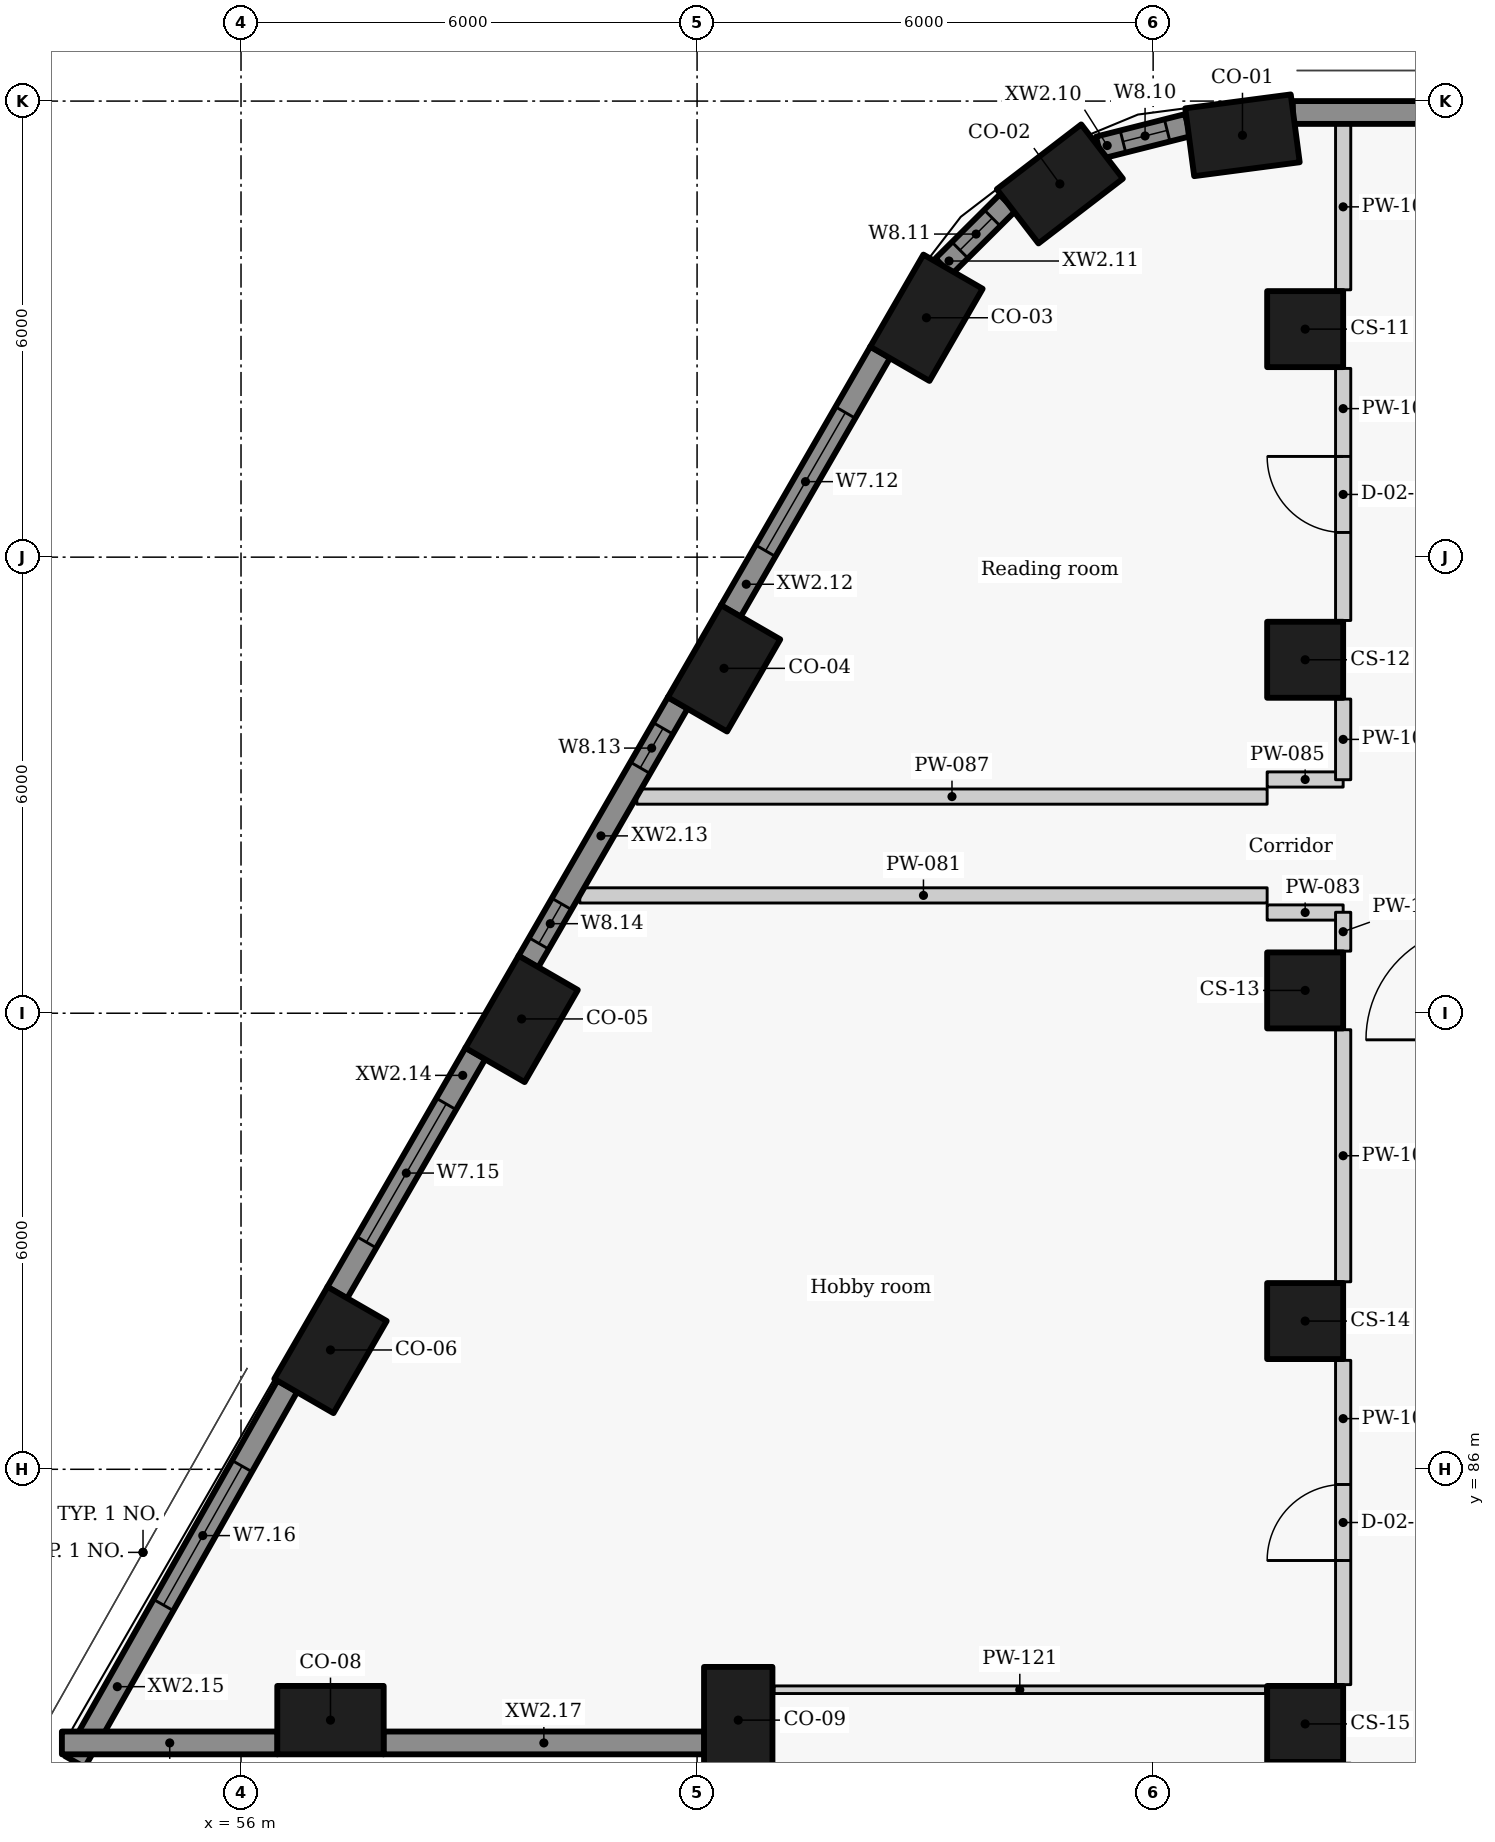
"""IFC4 building model, lengths in metres.
Left out: names, types, materials, properties, quantities, classifications, styles, units other than length and angle.
Written with IfcOpenShell. Run it as: python <this file> out.ifc"""

import sys

from ifc_helpers import new_model, si_unit, direction, frame, frame_2d, origin, origin_2d, place, context, subcontext, project, spatial, rectangle, extrude, element, fill, save


model = new_model("IFC4")
c1 = context("Model", 3, precision=1e-05, world=origin(), true_north=direction((0.0, 1.0)))
c2 = subcontext(c1, "Body", "Model", "MODEL_VIEW")
j1 = project(units=[si_unit("LENGTHUNIT", "METRE"), si_unit("PLANEANGLEUNIT", "RADIAN")], contexts=[c1])
p1 = place(None, origin())
s1 = spatial("IfcSite", under=j1, at=p1, CompositionType="ELEMENT")
p2 = place(p1, origin())
s2 = spatial("IfcBuilding", under=s1, at=p2, CompositionType="ELEMENT")
p3 = place(p2, frame((0.0, 0.0, 81.0)))
s3 = spatial("IfcBuildingStorey", under=s2, at=p3, CompositionType="ELEMENT", Elevation=81.0)
for number, where, z_axis, x_axis in (
    (1, (69.175, 103.55, 0.0), (0.0, 0.0, 1.0), (-0.991, -0.131, 0.0)),
    (2, (66.773, 102.91, 0.0), (0.0, 0.0, 1.0), (-0.793, -0.609, 0.0)),
    (3, (65.018, 101.149, 0.0), (0.0, 0.0, 1.0), (-0.5, -0.866, 0.0)),
    (4, (62.354, 96.537, 0.0), (0.0, 0.0, 1.0), (-0.5, -0.866, 0.0)),
    (5, (59.692, 91.925, 0.0), (0.0, 0.0, 1.0), (-0.5, -0.866, 0.0)),
    (6, (57.177, 87.57, 0.0), (0.0, 0.0, 1.0), (-0.5, -0.866, 0.0)),
    (7, (57.177, 82.7, 0.0), (0.0, 0.0, 1.0), (1.0, 0.0, 0.0)),
    (8, (62.542, 82.7, 0.0), (0.0, 0.0, 1.0), (0.0, -1.0, 0.0)),
):
    element("IfcColumn", number, at=place(p3, frame(where, z_axis=z_axis, x_axis=x_axis)), inside=s3, PredefinedType="COLUMN", context=c2, shape_type="SweptSolid", body=[
        extrude(rectangle(XDim=1.4, YDim=0.9, at=origin_2d()), origin(), (0.0, 0.0, 1.0), 3.3),
    ])
for number, where, z_axis, x_axis in (
    (9, (70.0, 101.0, 0.0), (0.0, 0.0, 1.0), (0.0, -1.0, 0.0)),
    (10, (70.0, 96.65, 0.0), (0.0, 0.0, 1.0), (0.0, -1.0, 0.0)),
    (11, (70.0, 92.3, 0.0), (0.0, 0.0, 1.0), (0.0, -1.0, 0.0)),
    (12, (70.0, 87.95, 0.0), (0.0, 0.0, 1.0), (0.0, -1.0, 0.0)),
    (13, (70.0, 82.65, 0.0), (0.0, 0.0, 1.0), (0.0, -1.0, 0.0)),
):
    element("IfcColumn", number, at=place(p3, frame(where, z_axis=z_axis, x_axis=x_axis)), inside=s3, PredefinedType="COLUMN", context=c2, shape_type="SweptSolid", body=[
        extrude(rectangle(XDim=1.0, YDim=1.0, at=origin_2d()), origin(), (0.0, 0.0, 1.0), 3.3),
    ])
p4 = place(p3, frame((90.129, 103.85, 0.0), z_axis=(0.0, 0.0, 1.0), x_axis=(-1.0, 0.0, 0.0)))
e14 = element("IfcWall", 14, at=p4, inside=s3, PredefinedType="SOLIDWALL", context=c2, shape_type="SweptSolid", body=[
    extrude(rectangle(XDim=20.291, YDim=0.3, at=frame_2d((10.146, 0.0))), origin(), (0.0, 0.0, 1.0), 2.425),
])
p5 = place(p3, frame((68.456, 103.683, 0.0), z_axis=(0.0, 0.0, 1.0), x_axis=(-0.969485113966, -0.245150186208, 0.0)))
e15 = element("IfcWall", 15, at=p5, inside=s3, PredefinedType="SOLIDWALL", context=c2, shape_type="SweptSolid", body=[
    extrude(rectangle(XDim=1.208, YDim=0.3, at=frame_2d((0.604, 0.0))), origin(), (0.0, 0.0, 1.0), 2.425),
])
p6 = place(p5, frame((0.28, 0.0, 0.9)))
e16 = element("IfcOpeningElement", 16, at=p6, cuts=e15, PredefinedType="OPENING", context=c2, shape_type="SweptSolid", body=[
    extrude(rectangle(XDim=0.6, YDim=1.1, at=frame_2d((0.3, 0.55))), frame((0.0, 0.16, 0.0), z_axis=(0.0, -1.0, 0.0), x_axis=(1.0, 0.0, 0.0)), (0.0, 0.0, 1.0), 0.32),
])
p7 = place(p3, frame((66.085, 102.663, 0.0), z_axis=(0.0, 0.0, 1.0), x_axis=(-0.708951665509, -0.705257070842, 0.0)))
e17 = element("IfcWall", 17, at=p7, inside=s3, PredefinedType="SOLIDWALL", context=c2, shape_type="SweptSolid", body=[
    extrude(rectangle(XDim=1.189, YDim=0.3, at=frame_2d((0.595, 0.0))), origin(), (0.0, 0.0, 1.0), 2.425),
])
p8 = place(p7, frame((0.284, 0.0, 0.9)))
e18 = element("IfcOpeningElement", 18, at=p8, cuts=e17, PredefinedType="OPENING", context=c2, shape_type="SweptSolid", body=[
    extrude(rectangle(XDim=0.6, YDim=1.1, at=frame_2d((0.3, 0.55))), frame((0.0, 0.16, 0.0), z_axis=(0.0, -1.0, 0.0), x_axis=(1.0, 0.0, 0.0)), (0.0, 0.0, 1.0), 0.32),
])
p9 = place(p3, frame((64.41, 100.697, 0.0), z_axis=(0.0, 0.0, 1.0), x_axis=(-0.500003583557, -0.866023334807, 0.0)))
e19 = element("IfcWall", 19, at=p9, inside=s3, PredefinedType="SOLIDWALL", context=c2, shape_type="SweptSolid", body=[
    extrude(rectangle(XDim=3.934, YDim=0.3, at=frame_2d((1.967, 0.0))), origin(), (0.0, 0.0, 1.0), 2.425),
])
p10 = place(p9, frame((0.917, 0.0, 0.9)))
e20 = element("IfcOpeningElement", 20, at=p10, cuts=e19, PredefinedType="OPENING", context=c2, shape_type="SweptSolid", body=[
    extrude(rectangle(XDim=2.1, YDim=1.1, at=frame_2d((1.05, 0.55))), frame((0.0, 0.16, 0.0), z_axis=(0.0, -1.0, 0.0), x_axis=(1.0, 0.0, 0.0)), (0.0, 0.0, 1.0), 0.32),
])
p11 = place(p3, frame((61.747, 96.084, 0.0), z_axis=(0.0, 0.0, 1.0), x_axis=(-0.499957037901, -0.866050206543, 0.0)))
e21 = element("IfcWall", 21, at=p11, inside=s3, PredefinedType="SOLIDWALL", context=c2, shape_type="SweptSolid", body=[
    extrude(rectangle(XDim=3.934, YDim=0.3, at=frame_2d((1.967, 0.0))), origin(), (0.0, 0.0, 1.0), 2.425),
])
p12 = place(p11, frame((0.389, 0.0, 0.9)))
e22 = element("IfcOpeningElement", 22, at=p12, cuts=e21, PredefinedType="OPENING", context=c2, shape_type="SweptSolid", body=[
    extrude(rectangle(XDim=0.6, YDim=1.1, at=frame_2d((0.3, 0.55))), frame((0.0, 0.16, 0.0), z_axis=(0.0, -1.0, 0.0), x_axis=(1.0, 0.0, 0.0)), (0.0, 0.0, 1.0), 0.32),
])
p13 = place(p11, frame((3.056, 0.0, 0.9)))
e23 = element("IfcOpeningElement", 23, at=p13, cuts=e21, PredefinedType="OPENING", context=c2, shape_type="SweptSolid", body=[
    extrude(rectangle(XDim=0.6, YDim=1.1, at=frame_2d((0.3, 0.55))), frame((0.0, 0.16, 0.0), z_axis=(0.0, -1.0, 0.0), x_axis=(1.0, 0.0, 0.0)), (0.0, 0.0, 1.0), 0.32),
])
p14 = place(p3, frame((59.084, 91.472, 0.0), z_axis=(0.0, 0.0, 1.0), x_axis=(-0.500009139881, -0.866020126807, 0.0)))
e24 = element("IfcWall", 24, at=p14, inside=s3, PredefinedType="SOLIDWALL", context=c2, shape_type="SweptSolid", body=[
    extrude(rectangle(XDim=3.637, YDim=0.3, at=frame_2d((1.818, 0.0))), origin(), (0.0, 0.0, 1.0), 2.425),
])
p15 = place(p14, frame((0.768, 0.0, 0.9)))
e25 = element("IfcOpeningElement", 25, at=p15, cuts=e24, PredefinedType="OPENING", context=c2, shape_type="SweptSolid", body=[
    extrude(rectangle(XDim=2.1, YDim=1.1, at=frame_2d((1.05, 0.55))), frame((0.0, 0.16, 0.0), z_axis=(0.0, -1.0, 0.0), x_axis=(1.0, 0.0, 0.0)), (0.0, 0.0, 1.0), 0.32),
])
p16 = place(p3, frame((56.609, 87.094, 0.0), z_axis=(0.0, 0.0, 1.0), x_axis=(-0.492456858874, -0.870336855561, 0.0)))
e26 = element("IfcWall", 26, at=p16, inside=s3, PredefinedType="SOLIDWALL", context=c2, shape_type="SweptSolid", body=[
    extrude(rectangle(XDim=5.677, YDim=0.3, at=frame_2d((2.838, 0.0))), origin(), (0.0, 0.0, 1.0), 2.425),
])
p17 = place(p16, frame((1.209, 0.0, 0.9)))
e27 = element("IfcOpeningElement", 27, at=p17, cuts=e26, PredefinedType="OPENING", context=c2, shape_type="SweptSolid", body=[
    extrude(rectangle(XDim=2.1, YDim=1.1, at=frame_2d((1.05, 0.55))), frame((0.0, 0.16, 0.0), z_axis=(0.0, -1.0, 0.0), x_axis=(1.0, 0.0, 0.0)), (0.0, 0.0, 1.0), 0.32),
])
p18 = place(p3, frame((53.643, 82.4, 0.0), z_axis=(0.0, 0.0, 1.0), x_axis=(1.0, 0.0, 0.0)))
e28 = element("IfcWall", 28, at=p18, inside=s3, PredefinedType="SOLIDWALL", context=c2, shape_type="SweptSolid", body=[
    extrude(rectangle(XDim=2.838, YDim=0.3, at=frame_2d((1.419, 0.0))), origin(), (0.0, 0.0, 1.0), 2.425),
])
p19 = place(p3, frame((57.873, 82.4, 0.0), z_axis=(0.0, 0.0, 1.0), x_axis=(1.0, 0.0, 0.0)))
e29 = element("IfcWall", 29, at=p19, inside=s3, PredefinedType="SOLIDWALL", context=c2, shape_type="SweptSolid", body=[
    extrude(rectangle(XDim=4.223, YDim=0.3, at=frame_2d((2.111, 0.0))), origin(), (0.0, 0.0, 1.0), 2.425),
])
p20 = place(p3, frame((60.457, 93.55, 0.0), z_axis=(0.0, 0.0, 1.0), x_axis=(1.0, 0.0, 0.0)))
e30 = element("IfcWall", 30, at=p20, inside=s3, PredefinedType="PARTITIONING", context=c2, shape_type="SweptSolid", body=[
    extrude(rectangle(XDim=9.043, YDim=0.2, at=frame_2d((4.521, 0.0))), origin(), (0.0, 0.0, 1.0), 2.405),
])
for number, where, z_axis, x_axis in (
    (31, (69.5, 93.325, 0.0), (0.0, 0.0, 1.0), (1.0, 0.0, 0.0)),
    (32, (69.5, 95.075, 0.0), (0.0, 0.0, 1.0), (1.0, 0.0, 0.0)),
):
    element("IfcWall", number, at=place(p3, frame(where, z_axis=z_axis, x_axis=x_axis)), inside=s3, PredefinedType="PARTITIONING", context=c2, shape_type="SweptSolid", body=[
        extrude(rectangle(XDim=1.0, YDim=0.2, at=frame_2d((0.5, 0.0))), origin(), (0.0, 0.0, 1.0), 2.505),
    ])
p21 = place(p3, frame((61.207, 94.85, 0.0), z_axis=(0.0, 0.0, 1.0), x_axis=(1.0, 0.0, 0.0)))
e33 = element("IfcWall", 33, at=p21, inside=s3, PredefinedType="PARTITIONING", context=c2, shape_type="SweptSolid", body=[
    extrude(rectangle(XDim=8.293, YDim=0.2, at=frame_2d((4.146, 0.0))), origin(), (0.0, 0.0, 1.0), 2.405),
])
p22 = place(p3, frame((70.5, 83.167, 0.0), z_axis=(0.0, 0.0, 1.0), x_axis=(0.0, 1.0, 0.0)))
e34 = element("IfcWall", 34, at=p22, inside=s3, PredefinedType="PARTITIONING", context=c2, shape_type="SweptSolid", body=[
    extrude(rectangle(XDim=4.266, YDim=0.2, at=frame_2d((2.133, 0.0))), origin(), (0.0, 0.0, 1.0), 3.025),
])
p23 = place(p22, frame((1.633, 0.0, 0.0)))
e35 = element("IfcOpeningElement", 35, at=p23, cuts=e34, PredefinedType="OPENING", context=c2, shape_type="SweptSolid", body=[
    extrude(rectangle(XDim=1.0, YDim=2.1, at=frame_2d((0.5, 1.05))), frame((0.0, 0.11, 0.0), z_axis=(0.0, -1.0, 0.0), x_axis=(1.0, 0.0, 0.0)), (0.0, 0.0, 1.0), 0.22),
])
p24 = place(p3, frame((70.5, 88.467, 0.0), z_axis=(0.0, 0.0, 1.0), x_axis=(0.0, 1.0, 0.0)))
e36 = element("IfcWall", 36, at=p24, inside=s3, PredefinedType="PARTITIONING", context=c2, shape_type="SweptSolid", body=[
    extrude(rectangle(XDim=3.316, YDim=0.2, at=frame_2d((1.658, 0.0))), origin(), (0.0, 0.0, 1.0), 3.025),
])
p25 = place(p3, frame((70.5, 92.817, 0.0), z_axis=(0.0, 0.0, 1.0), x_axis=(0.0, 1.0, 0.0)))
e37 = element("IfcWall", 37, at=p25, inside=s3, PredefinedType="PARTITIONING", context=c2, shape_type="SweptSolid", body=[
    extrude(rectangle(XDim=0.511, YDim=0.2, at=frame_2d((0.255, 0.0))), origin(), (0.0, 0.0, 1.0), 3.025),
])
p26 = place(p3, frame((70.5, 95.072, 0.0), z_axis=(0.0, 0.0, 1.0), x_axis=(0.0, 1.0, 0.0)))
e38 = element("IfcWall", 38, at=p26, inside=s3, PredefinedType="PARTITIONING", context=c2, shape_type="SweptSolid", body=[
    extrude(rectangle(XDim=1.061, YDim=0.2, at=frame_2d((0.531, 0.0))), origin(), (0.0, 0.0, 1.0), 3.025),
])
p27 = place(p3, frame((70.5, 97.167, 0.0), z_axis=(0.0, 0.0, 1.0), x_axis=(0.0, 1.0, 0.0)))
e39 = element("IfcWall", 39, at=p27, inside=s3, PredefinedType="PARTITIONING", context=c2, shape_type="SweptSolid", body=[
    extrude(rectangle(XDim=3.316, YDim=0.2, at=frame_2d((1.658, 0.0))), origin(), (0.0, 0.0, 1.0), 3.025),
])
p28 = place(p27, frame((1.158, 0.0, 0.0)))
e40 = element("IfcOpeningElement", 40, at=p28, cuts=e39, PredefinedType="OPENING", context=c2, shape_type="SweptSolid", body=[
    extrude(rectangle(XDim=1.0, YDim=2.1, at=frame_2d((0.5, 1.05))), frame((0.0, 0.11, 0.0), z_axis=(0.0, -1.0, 0.0), x_axis=(1.0, 0.0, 0.0)), (0.0, 0.0, 1.0), 0.22),
])
p29 = place(p3, frame((70.5, 101.517, 0.0), z_axis=(0.0, 0.0, 1.0), x_axis=(0.0, 1.0, 0.0)))
e41 = element("IfcWall", 41, at=p29, inside=s3, PredefinedType="PARTITIONING", context=c2, shape_type="SweptSolid", body=[
    extrude(rectangle(XDim=2.183, YDim=0.2, at=frame_2d((1.091, 0.0))), origin(), (0.0, 0.0, 1.0), 3.025),
])
p30 = place(p3, frame((63.012, 83.1, 0.0), z_axis=(0.0, 0.0, 1.0), x_axis=(1.0, 0.0, 0.0)))
e42 = element("IfcWall", 42, at=p30, inside=s3, PredefinedType="PARTITIONING", context=c2, shape_type="SweptSolid", body=[
    extrude(rectangle(XDim=6.468, YDim=0.1, at=frame_2d((3.234, 0.0))), origin(), (0.0, 0.0, 1.0), 3.025),
])
p31 = place(p6, origin())
e43 = element("IfcWindow", 43, at=p31, inside=s3, PartitioningType="SINGLE_PANEL", PredefinedType="WINDOW", context=c2, shape_type="SweptSolid", body=[
    extrude(rectangle(XDim=0.6, YDim=1.1, at=frame_2d((0.3, 0.55))), frame((0.0, 0.03, 0.0), z_axis=(0.0, -1.0, 0.0), x_axis=(1.0, 0.0, 0.0)), (0.0, 0.0, 1.0), 0.06),
])
fill(e16, e43)
p32 = place(p8, origin())
e44 = element("IfcWindow", 44, at=p32, inside=s3, PartitioningType="SINGLE_PANEL", PredefinedType="WINDOW", context=c2, shape_type="SweptSolid", body=[
    extrude(rectangle(XDim=0.6, YDim=1.1, at=frame_2d((0.3, 0.55))), frame((0.0, 0.03, 0.0), z_axis=(0.0, -1.0, 0.0), x_axis=(1.0, 0.0, 0.0)), (0.0, 0.0, 1.0), 0.06),
])
fill(e18, e44)
p33 = place(p10, origin())
e45 = element("IfcWindow", 45, at=p33, inside=s3, PartitioningType="SINGLE_PANEL", PredefinedType="WINDOW", context=c2, shape_type="SweptSolid", body=[
    extrude(rectangle(XDim=2.1, YDim=1.1, at=frame_2d((1.05, 0.55))), frame((0.0, 0.03, 0.0), z_axis=(0.0, -1.0, 0.0), x_axis=(1.0, 0.0, 0.0)), (0.0, 0.0, 1.0), 0.06),
])
fill(e20, e45)
p34 = place(p12, origin())
e46 = element("IfcWindow", 46, at=p34, inside=s3, PartitioningType="SINGLE_PANEL", PredefinedType="WINDOW", context=c2, shape_type="SweptSolid", body=[
    extrude(rectangle(XDim=0.6, YDim=1.1, at=frame_2d((0.3, 0.55))), frame((0.0, 0.03, 0.0), z_axis=(0.0, -1.0, 0.0), x_axis=(1.0, 0.0, 0.0)), (0.0, 0.0, 1.0), 0.06),
])
fill(e22, e46)
p35 = place(p13, origin())
e47 = element("IfcWindow", 47, at=p35, inside=s3, PartitioningType="SINGLE_PANEL", PredefinedType="WINDOW", context=c2, shape_type="SweptSolid", body=[
    extrude(rectangle(XDim=0.6, YDim=1.1, at=frame_2d((0.3, 0.55))), frame((0.0, 0.03, 0.0), z_axis=(0.0, -1.0, 0.0), x_axis=(1.0, 0.0, 0.0)), (0.0, 0.0, 1.0), 0.06),
])
fill(e23, e47)
p36 = place(p15, origin())
e48 = element("IfcWindow", 48, at=p36, inside=s3, PartitioningType="SINGLE_PANEL", PredefinedType="WINDOW", context=c2, shape_type="SweptSolid", body=[
    extrude(rectangle(XDim=2.1, YDim=1.1, at=frame_2d((1.05, 0.55))), frame((0.0, 0.03, 0.0), z_axis=(0.0, -1.0, 0.0), x_axis=(1.0, 0.0, 0.0)), (0.0, 0.0, 1.0), 0.06),
])
fill(e25, e48)
p37 = place(p17, origin())
e49 = element("IfcWindow", 49, at=p37, inside=s3, PartitioningType="SINGLE_PANEL", PredefinedType="WINDOW", context=c2, shape_type="SweptSolid", body=[
    extrude(rectangle(XDim=2.1, YDim=1.1, at=frame_2d((1.05, 0.55))), frame((0.0, 0.03, 0.0), z_axis=(0.0, -1.0, 0.0), x_axis=(1.0, 0.0, 0.0)), (0.0, 0.0, 1.0), 0.06),
])
fill(e27, e49)
p38 = place(p23, origin())
e50 = element("IfcDoor", 50, at=p38, inside=s3, OperationType="SINGLE_SWING_LEFT", PredefinedType="DOOR", context=c2, shape_type="SweptSolid", body=[
    extrude(rectangle(XDim=1.0, YDim=2.1, at=frame_2d((0.5, 1.05))), frame((0.0, 0.025, 0.0), z_axis=(0.0, -1.0, 0.0), x_axis=(1.0, 0.0, 0.0)), (0.0, 0.0, 1.0), 0.05),
])
fill(e35, e50)
p39 = place(p28, origin())
e51 = element("IfcDoor", 51, at=p39, inside=s3, OperationType="SINGLE_SWING_RIGHT", PredefinedType="DOOR", context=c2, shape_type="SweptSolid", body=[
    extrude(rectangle(XDim=1.0, YDim=2.1, at=frame_2d((0.5, 1.05))), frame((0.0, 0.025, 0.0), z_axis=(0.0, -1.0, 0.0), x_axis=(1.0, 0.0, 0.0)), (0.0, 0.0, 1.0), 0.05),
])
fill(e40, e51)
save(model, sys.argv[1])
